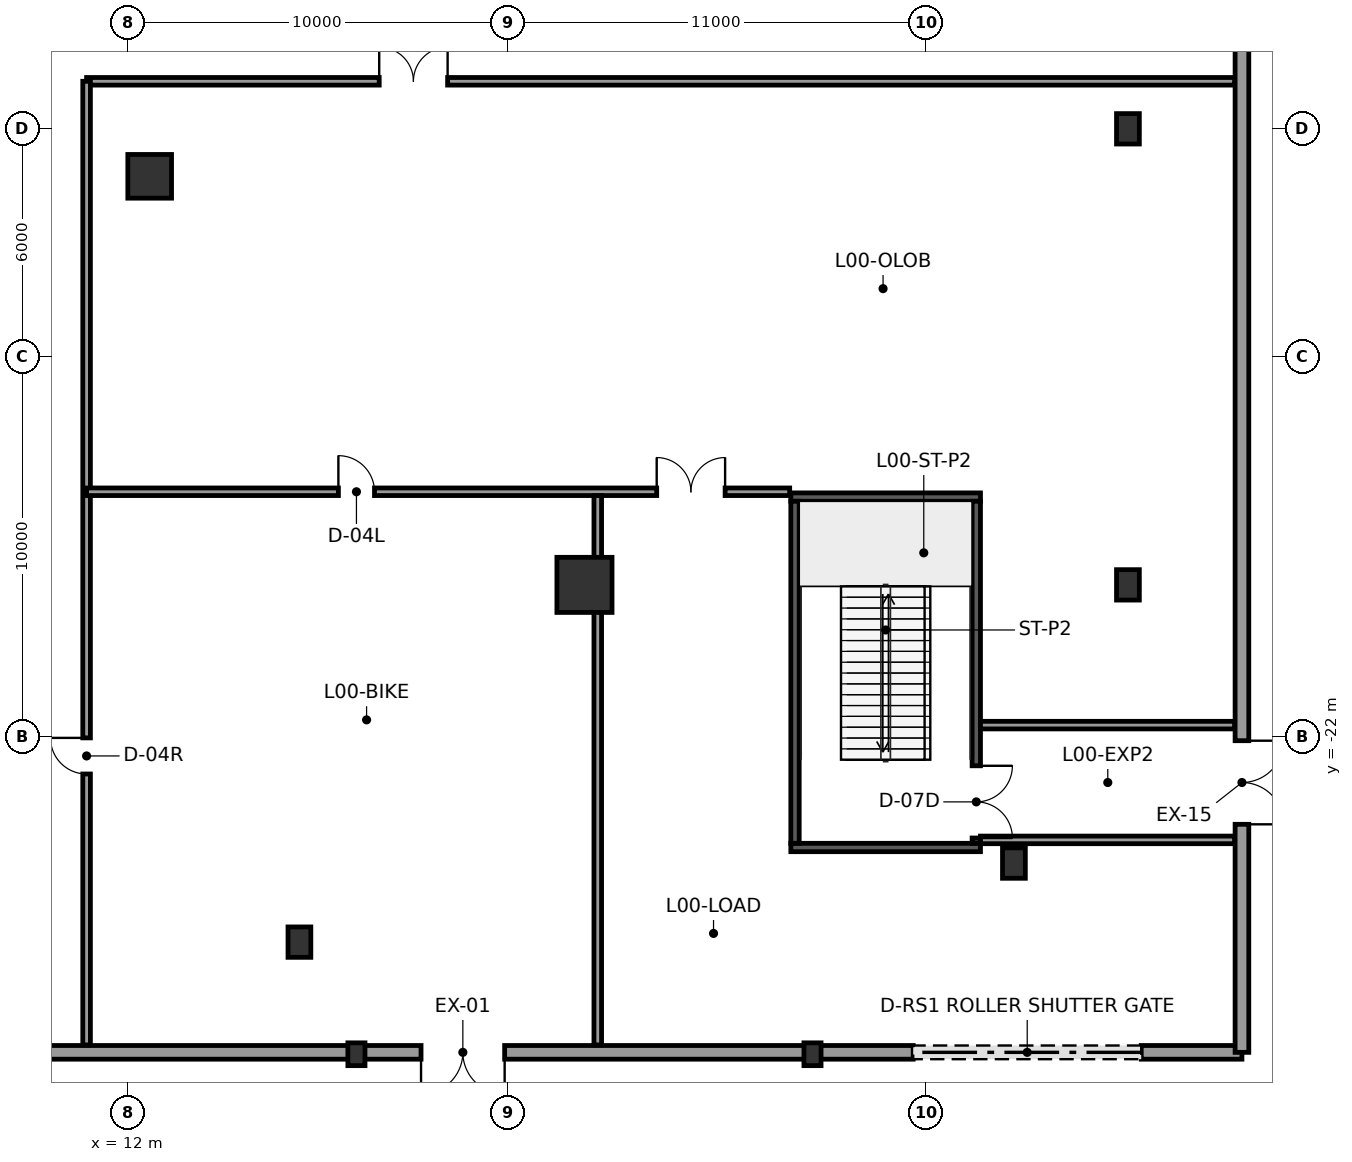
"""IFC4 building model, lengths in metres.
Left out: names, types, materials, properties, quantities, classifications, styles, units other than length and angle.
Written with IfcOpenShell. Run it as: python <this file> out.ifc"""

import sys

from ifc_helpers import new_model, si_unit, direction, frame, frame_2d, origin, origin_2d, place, context, subcontext, project, spatial, rectangle, hollow_rectangle, extrude, element, fill, save


model = new_model("IFC4")
c1 = context("Model", 3, precision=1e-05, world=origin(), true_north=direction((0.0, 1.0)))
c2 = subcontext(c1, "Body", "Model", "MODEL_VIEW")
j1 = project(units=[si_unit("LENGTHUNIT", "METRE"), si_unit("PLANEANGLEUNIT", "RADIAN")], contexts=[c1])
p1 = place(None, origin())
s1 = spatial("IfcSite", under=j1, at=p1, CompositionType="ELEMENT")
p2 = place(p1, origin())
s2 = spatial("IfcBuilding", under=s1, at=p2, CompositionType="ELEMENT")
p3 = place(p2, origin())
s3 = spatial("IfcBuildingStorey", under=s2, at=p3, CompositionType="ELEMENT", Elevation=0.0)
p4 = place(p3, frame((12.56, -7.25, 0.0), z_axis=(0.0, 0.0, 1.0), x_axis=(1.0, 0.0, 0.0)))
e1 = element("IfcColumn", 1, at=p4, inside=s3, PredefinedType="COLUMN", context=c2, shape_type="SweptSolid", body=[
    extrude(rectangle(XDim=1.15, YDim=1.15, at=origin_2d()), origin(), (0.0, 0.0, 1.0), 6.0),
])
p5 = place(p3, frame((24.0, -18.0, 0.0), z_axis=(0.0, 0.0, 1.0), x_axis=(1.0, 0.0, 0.0)))
e2 = element("IfcColumn", 2, at=p5, inside=s3, PredefinedType="COLUMN", context=c2, shape_type="SweptSolid", body=[
    extrude(rectangle(XDim=1.45, YDim=1.45, at=origin_2d()), origin(), (0.0, 0.0, 1.0), 6.0),
])
for number, where, z_axis, x_axis in (
    (3, (38.3, -18.0, 0.0), (0.0, 0.0, 1.0), (1.0, 0.0, 0.0)),
    (4, (38.3, -6.0, 0.0), (0.0, 0.0, 1.0), (1.0, 0.0, 0.0)),
    (5, (16.5, -27.4, 0.0), (0.0, 0.0, 1.0), (1.0, 0.0, 0.0)),
    (6, (35.3, -25.32, 0.0), (0.0, 0.0, 1.0), (1.0, 0.0, 0.0)),
):
    element("IfcColumn", number, at=place(p3, frame(where, z_axis=z_axis, x_axis=x_axis)), inside=s3, PredefinedType="COLUMN", context=c2, shape_type="SweptSolid", body=[
        extrude(hollow_rectangle(XDim=0.6, YDim=0.8, WallThickness=0.05, at=origin_2d()), origin(), (0.0, 0.0, 1.0), 6.0),
    ])
for number, where, z_axis, x_axis in (
    (7, (18.0, -30.35, -0.3), (0.0, 0.0, 1.0), (1.0, 0.0, 0.0)),
    (8, (30.0, -30.35, -0.3), (0.0, 0.0, 1.0), (1.0, 0.0, 0.0)),
):
    element("IfcColumn", number, at=place(p3, frame(where, z_axis=z_axis, x_axis=x_axis)), inside=s3, PredefinedType="PILASTER", context=c2, shape_type="SweptSolid", body=[
        extrude(rectangle(XDim=0.45, YDim=0.6, at=origin_2d()), origin(), (0.0, 0.0, 1.0), 6.3),
    ])
p6 = place(p3, frame((41.3, -30.3, 0.0), z_axis=(0.0, 0.0, 1.0), x_axis=(-1.0, 0.0, 0.0)))
e9 = element("IfcWall", 9, at=p6, inside=s3, PredefinedType="STANDARD", context=c2, shape_type="SweptSolid", body=[
    extrude(rectangle(XDim=82.6, YDim=0.36, at=frame_2d((41.3, 0.0))), origin(), (0.0, 0.0, 1.0), 5.7),
])
p7 = place(p6, frame((2.65, 0.0, 0.0)))
e10 = element("IfcOpeningElement", 10, at=p7, cuts=e9, PredefinedType="OPENING", context=c2, shape_type="SweptSolid", body=[
    extrude(rectangle(XDim=6.0, YDim=4.5, at=frame_2d((3.0, 2.25))), frame((0.0, 0.19, 0.0), z_axis=(0.0, -1.0, 0.0), x_axis=(1.0, 0.0, 0.0)), (0.0, 0.0, 1.0), 0.38),
])
p8 = place(p6, frame((19.4, 0.0, 0.0)))
e11 = element("IfcOpeningElement", 11, at=p8, cuts=e9, PredefinedType="OPENING", context=c2, shape_type="SweptSolid", body=[
    extrude(rectangle(XDim=2.2, YDim=2.4, at=frame_2d((1.1, 1.2))), frame((0.0, 0.19, 0.0), z_axis=(0.0, -1.0, 0.0), x_axis=(1.0, 0.0, 0.0)), (0.0, 0.0, 1.0), 0.38),
])
p9 = place(p6, frame((43.4, 0.0, 0.0)))
e12 = element("IfcOpeningElement", 12, at=p9, cuts=e9, PredefinedType="OPENING", context=c2, shape_type="SweptSolid", body=[
    extrude(rectangle(XDim=2.2, YDim=2.4, at=frame_2d((1.1, 1.2))), frame((0.0, 0.19, 0.0), z_axis=(0.0, -1.0, 0.0), x_axis=(1.0, 0.0, 0.0)), (0.0, 0.0, 1.0), 0.38),
])
p10 = place(p6, frame((61.0, 0.0, 0.0)))
e13 = element("IfcOpeningElement", 13, at=p10, cuts=e9, PredefinedType="OPENING", context=c2, shape_type="SweptSolid", body=[
    extrude(rectangle(XDim=2.2, YDim=2.4, at=frame_2d((1.1, 1.2))), frame((0.0, 0.19, 0.0), z_axis=(0.0, -1.0, 0.0), x_axis=(1.0, 0.0, 0.0)), (0.0, 0.0, 1.0), 0.38),
])
p11 = place(p6, frame((75.85, 0.0, 0.0)))
e14 = element("IfcOpeningElement", 14, at=p11, cuts=e9, PredefinedType="OPENING", context=c2, shape_type="SweptSolid", body=[
    extrude(rectangle(XDim=2.2, YDim=2.4, at=frame_2d((1.1, 1.2))), frame((0.0, 0.19, 0.0), z_axis=(0.0, -1.0, 0.0), x_axis=(1.0, 0.0, 0.0)), (0.0, 0.0, 1.0), 0.38),
])
p12 = place(p3, frame((41.3, 30.3, 0.0), z_axis=(0.0, 0.0, 1.0), x_axis=(0.0, -1.0, 0.0)))
e15 = element("IfcWall", 15, at=p12, inside=s3, PredefinedType="STANDARD", context=c2, shape_type="SweptSolid", body=[
    extrude(rectangle(XDim=60.6, YDim=0.36, at=frame_2d((30.3, 0.0))), origin(), (0.0, 0.0, 1.0), 5.7),
])
p13 = place(p12, frame((6.0, 0.0, 0.0)))
e16 = element("IfcOpeningElement", 16, at=p13, cuts=e15, PredefinedType="OPENING", context=c2, shape_type="SweptSolid", body=[
    extrude(rectangle(XDim=2.2, YDim=2.4, at=frame_2d((1.1, 1.2))), frame((0.0, 0.19, 0.0), z_axis=(0.0, -1.0, 0.0), x_axis=(1.0, 0.0, 0.0)), (0.0, 0.0, 1.0), 0.38),
])
p14 = place(p12, frame((18.0, 0.0, 0.0)))
e17 = element("IfcOpeningElement", 17, at=p14, cuts=e15, PredefinedType="OPENING", context=c2, shape_type="SweptSolid", body=[
    extrude(rectangle(XDim=2.2, YDim=2.4, at=frame_2d((1.1, 1.2))), frame((0.0, 0.19, 0.0), z_axis=(0.0, -1.0, 0.0), x_axis=(1.0, 0.0, 0.0)), (0.0, 0.0, 1.0), 0.38),
])
p15 = place(p12, frame((52.4, 0.0, 0.0)))
e18 = element("IfcOpeningElement", 18, at=p15, cuts=e15, PredefinedType="OPENING", context=c2, shape_type="SweptSolid", body=[
    extrude(rectangle(XDim=2.2, YDim=2.4, at=frame_2d((1.1, 1.2))), frame((0.0, 0.19, 0.0), z_axis=(0.0, -1.0, 0.0), x_axis=(1.0, 0.0, 0.0)), (0.0, 0.0, 1.0), 0.38),
])
for number, where, z_axis, x_axis in (
    (19, (29.43, -24.91, 0.0), (0.0, 0.0, 1.0), (1.0, 0.0, 0.0)),
    (20, (29.43, -15.69, 0.0), (0.0, 0.0, 1.0), (1.0, 0.0, 0.0)),
):
    element("IfcWall", number, at=place(p3, frame(where, z_axis=z_axis, x_axis=x_axis)), inside=s3, PredefinedType="SHEAR", context=c2, shape_type="SweptSolid", body=[
        extrude(rectangle(XDim=4.99, YDim=0.22, at=frame_2d((2.495, 0.0))), origin(), (0.0, 0.0, 1.0), 5.7),
    ])
p16 = place(p3, frame((29.54, -24.8, 0.0), z_axis=(0.0, 0.0, 1.0), x_axis=(0.0, 1.0, 0.0)))
e21 = element("IfcWall", 21, at=p16, inside=s3, PredefinedType="SHEAR", context=c2, shape_type="SweptSolid", body=[
    extrude(rectangle(XDim=9.0, YDim=0.22, at=frame_2d((4.5, 0.0))), origin(), (0.0, 0.0, 1.0), 5.7),
])
p17 = place(p3, frame((34.31, -15.8, 0.0), z_axis=(0.0, 0.0, 1.0), x_axis=(0.0, -1.0, 0.0)))
e22 = element("IfcWall", 22, at=p17, inside=s3, PredefinedType="SHEAR", context=c2, shape_type="SweptSolid", body=[
    extrude(rectangle(XDim=9.0, YDim=0.22, at=frame_2d((4.5, 0.0))), origin(), (0.0, 0.0, 1.0), 5.7),
])
p18 = place(p17, frame((6.96, 0.0, 0.0)))
e23 = element("IfcOpeningElement", 23, at=p18, cuts=e22, PredefinedType="OPENING", context=c2, shape_type="SweptSolid", body=[
    extrude(rectangle(XDim=1.9, YDim=2.2, at=frame_2d((0.95, 1.1))), frame((0.0, 0.12, 0.0), z_axis=(0.0, -1.0, 0.0), x_axis=(1.0, 0.0, 0.0)), (0.0, 0.0, 1.0), 0.24),
])
for number, where, z_axis, x_axis in (
    (24, (34.42, -24.71, 0.0), (0.0, 0.0, 1.0), (1.0, 0.0, 0.0)),
    (25, (34.42, -21.69, 0.0), (0.0, 0.0, 1.0), (1.0, 0.0, 0.0)),
):
    element("IfcWall", number, at=place(p3, frame(where, z_axis=z_axis, x_axis=x_axis)), inside=s3, PredefinedType="PARTITIONING", context=c2, shape_type="SweptSolid", body=[
        extrude(rectangle(XDim=6.685, YDim=0.2, at=frame_2d((3.343, 0.0))), origin(), (0.0, 0.0, 1.0), 5.7),
    ])
p19 = place(p3, frame((10.9, -4.75, 0.0), z_axis=(0.0, 0.0, 1.0), x_axis=(1.0, 0.0, 0.0)))
e26 = element("IfcWall", 26, at=p19, inside=s3, PredefinedType="PARTITIONING", context=c2, shape_type="SweptSolid", body=[
    extrude(rectangle(XDim=30.205, YDim=0.2, at=frame_2d((15.103, 0.0))), origin(), (0.0, 0.0, 1.0), 5.7),
])
p20 = place(p19, frame((7.699, 0.0, 0.0)))
e27 = element("IfcOpeningElement", 27, at=p20, cuts=e26, PredefinedType="OPENING", context=c2, shape_type="SweptSolid", body=[
    extrude(rectangle(XDim=1.8, YDim=2.2, at=frame_2d((0.9, 1.1))), frame((0.0, 0.11, 0.0), z_axis=(0.0, -1.0, 0.0), x_axis=(1.0, 0.0, 0.0)), (0.0, 0.0, 1.0), 0.22),
])
p21 = place(p3, frame((10.9, -30.105, 0.0), z_axis=(0.0, 0.0, 1.0), x_axis=(0.0, 1.0, 0.0)))
e28 = element("IfcWall", 28, at=p21, inside=s3, PredefinedType="PARTITIONING", context=c2, shape_type="SweptSolid", body=[
    extrude(rectangle(XDim=25.355, YDim=0.2, at=frame_2d((12.677, 0.0))), origin(), (0.0, 0.0, 1.0), 5.7),
])
p22 = place(p21, frame((7.129, 0.0, 0.0)))
e29 = element("IfcOpeningElement", 29, at=p22, cuts=e28, PredefinedType="OPENING", context=c2, shape_type="SweptSolid", body=[
    extrude(rectangle(XDim=0.95, YDim=2.15, at=frame_2d((0.475, 1.075))), frame((0.0, 0.11, 0.0), z_axis=(0.0, -1.0, 0.0), x_axis=(1.0, 0.0, 0.0)), (0.0, 0.0, 1.0), 0.22),
])
p23 = place(p3, frame((10.9, -15.55, 0.0), z_axis=(0.0, 0.0, 1.0), x_axis=(1.0, 0.0, 0.0)))
e30 = element("IfcWall", 30, at=p23, inside=s3, PredefinedType="PARTITIONING", context=c2, shape_type="SweptSolid", body=[
    extrude(rectangle(XDim=18.5, YDim=0.2, at=frame_2d((9.25, 0.0))), origin(), (0.0, 0.0, 1.0), 5.7),
])
p24 = place(p23, frame((6.625, 0.0, 0.0)))
e31 = element("IfcOpeningElement", 31, at=p24, cuts=e30, PredefinedType="OPENING", context=c2, shape_type="SweptSolid", body=[
    extrude(rectangle(XDim=0.95, YDim=2.15, at=frame_2d((0.475, 1.075))), frame((0.0, 0.11, 0.0), z_axis=(0.0, -1.0, 0.0), x_axis=(1.0, 0.0, 0.0)), (0.0, 0.0, 1.0), 0.22),
])
p25 = place(p23, frame((15.001, 0.0, 0.0)))
e32 = element("IfcOpeningElement", 32, at=p25, cuts=e30, PredefinedType="OPENING", context=c2, shape_type="SweptSolid", body=[
    extrude(rectangle(XDim=1.8, YDim=2.2, at=frame_2d((0.9, 1.1))), frame((0.0, 0.11, 0.0), z_axis=(0.0, -1.0, 0.0), x_axis=(1.0, 0.0, 0.0)), (0.0, 0.0, 1.0), 0.22),
])
p26 = place(p3, frame((24.35, -30.105, 0.0), z_axis=(0.0, 0.0, 1.0), x_axis=(0.0, 1.0, 0.0)))
e33 = element("IfcWall", 33, at=p26, inside=s3, PredefinedType="PARTITIONING", context=c2, shape_type="SweptSolid", body=[
    extrude(rectangle(XDim=14.455, YDim=0.2, at=frame_2d((7.228, 0.0))), origin(), (0.0, 0.0, 1.0), 5.7),
])
p27 = place(p7, origin())
e34 = element("IfcDoor", 34, at=p27, inside=s3, OperationType="ROLLINGUP", PredefinedType="GATE", context=c2, shape_type="SweptSolid", body=[
    extrude(rectangle(XDim=6.0, YDim=4.5, at=frame_2d((3.0, 2.25))), frame((0.0, 0.025, 0.0), z_axis=(0.0, -1.0, 0.0), x_axis=(1.0, 0.0, 0.0)), (0.0, 0.0, 1.0), 0.05),
])
fill(e10, e34)
p28 = place(p8, origin())
e35 = element("IfcDoor", 35, at=p28, inside=s3, OperationType="DOUBLE_DOOR_SINGLE_SWING", PredefinedType="DOOR", context=c2, shape_type="SweptSolid", body=[
    extrude(rectangle(XDim=2.2, YDim=2.4, at=frame_2d((1.1, 1.2))), frame((0.0, 0.025, 0.0), z_axis=(0.0, -1.0, 0.0), x_axis=(1.0, 0.0, 0.0)), (0.0, 0.0, 1.0), 0.05),
])
fill(e11, e35)
p29 = place(p15, origin())
e36 = element("IfcDoor", 36, at=p29, inside=s3, OperationType="DOUBLE_DOOR_SINGLE_SWING", PredefinedType="DOOR", context=c2, shape_type="SweptSolid", body=[
    extrude(rectangle(XDim=2.2, YDim=2.4, at=frame_2d((1.1, 1.2))), frame((0.0, 0.025, 0.0), z_axis=(0.0, -1.0, 0.0), x_axis=(1.0, 0.0, 0.0)), (0.0, 0.0, 1.0), 0.05),
])
fill(e18, e36)
p30 = place(p18, origin())
e37 = element("IfcDoor", 37, at=p30, inside=s3, OperationType="DOUBLE_DOOR_SINGLE_SWING", PredefinedType="DOOR", context=c2, shape_type="SweptSolid", body=[
    extrude(rectangle(XDim=1.9, YDim=2.2, at=frame_2d((0.95, 1.1))), frame((0.0, 0.025, 0.0), z_axis=(0.0, -1.0, 0.0), x_axis=(1.0, 0.0, 0.0)), (0.0, 0.0, 1.0), 0.05),
])
fill(e23, e37)
p31 = place(p20, origin())
e38 = element("IfcDoor", 38, at=p31, inside=s3, OperationType="DOUBLE_DOOR_SINGLE_SWING", PredefinedType="DOOR", context=c2, shape_type="SweptSolid", body=[
    extrude(rectangle(XDim=1.8, YDim=2.2, at=frame_2d((0.9, 1.1))), frame((0.0, 0.025, 0.0), z_axis=(0.0, -1.0, 0.0), x_axis=(1.0, 0.0, 0.0)), (0.0, 0.0, 1.0), 0.05),
])
fill(e27, e38)
p32 = place(p22, origin())
e39 = element("IfcDoor", 39, at=p32, inside=s3, OperationType="SINGLE_SWING_RIGHT", PredefinedType="DOOR", context=c2, shape_type="SweptSolid", body=[
    extrude(rectangle(XDim=0.95, YDim=2.15, at=frame_2d((0.475, 1.075))), frame((0.0, 0.025, 0.0), z_axis=(0.0, -1.0, 0.0), x_axis=(1.0, 0.0, 0.0)), (0.0, 0.0, 1.0), 0.05),
])
fill(e29, e39)
p33 = place(p24, origin())
e40 = element("IfcDoor", 40, at=p33, inside=s3, OperationType="SINGLE_SWING_LEFT", PredefinedType="DOOR", context=c2, shape_type="SweptSolid", body=[
    extrude(rectangle(XDim=0.95, YDim=2.15, at=frame_2d((0.475, 1.075))), frame((0.0, 0.025, 0.0), z_axis=(0.0, -1.0, 0.0), x_axis=(1.0, 0.0, 0.0)), (0.0, 0.0, 1.0), 0.05),
])
fill(e31, e40)
p34 = place(p25, origin())
e41 = element("IfcDoor", 41, at=p34, inside=s3, OperationType="DOUBLE_DOOR_SINGLE_SWING", PredefinedType="DOOR", context=c2, shape_type="SweptSolid", body=[
    extrude(rectangle(XDim=1.8, YDim=2.2, at=frame_2d((0.9, 1.1))), frame((0.0, 0.025, 0.0), z_axis=(0.0, -1.0, 0.0), x_axis=(1.0, 0.0, 0.0)), (0.0, 0.0, 1.0), 0.05),
])
fill(e32, e41)
save(model, sys.argv[1])
